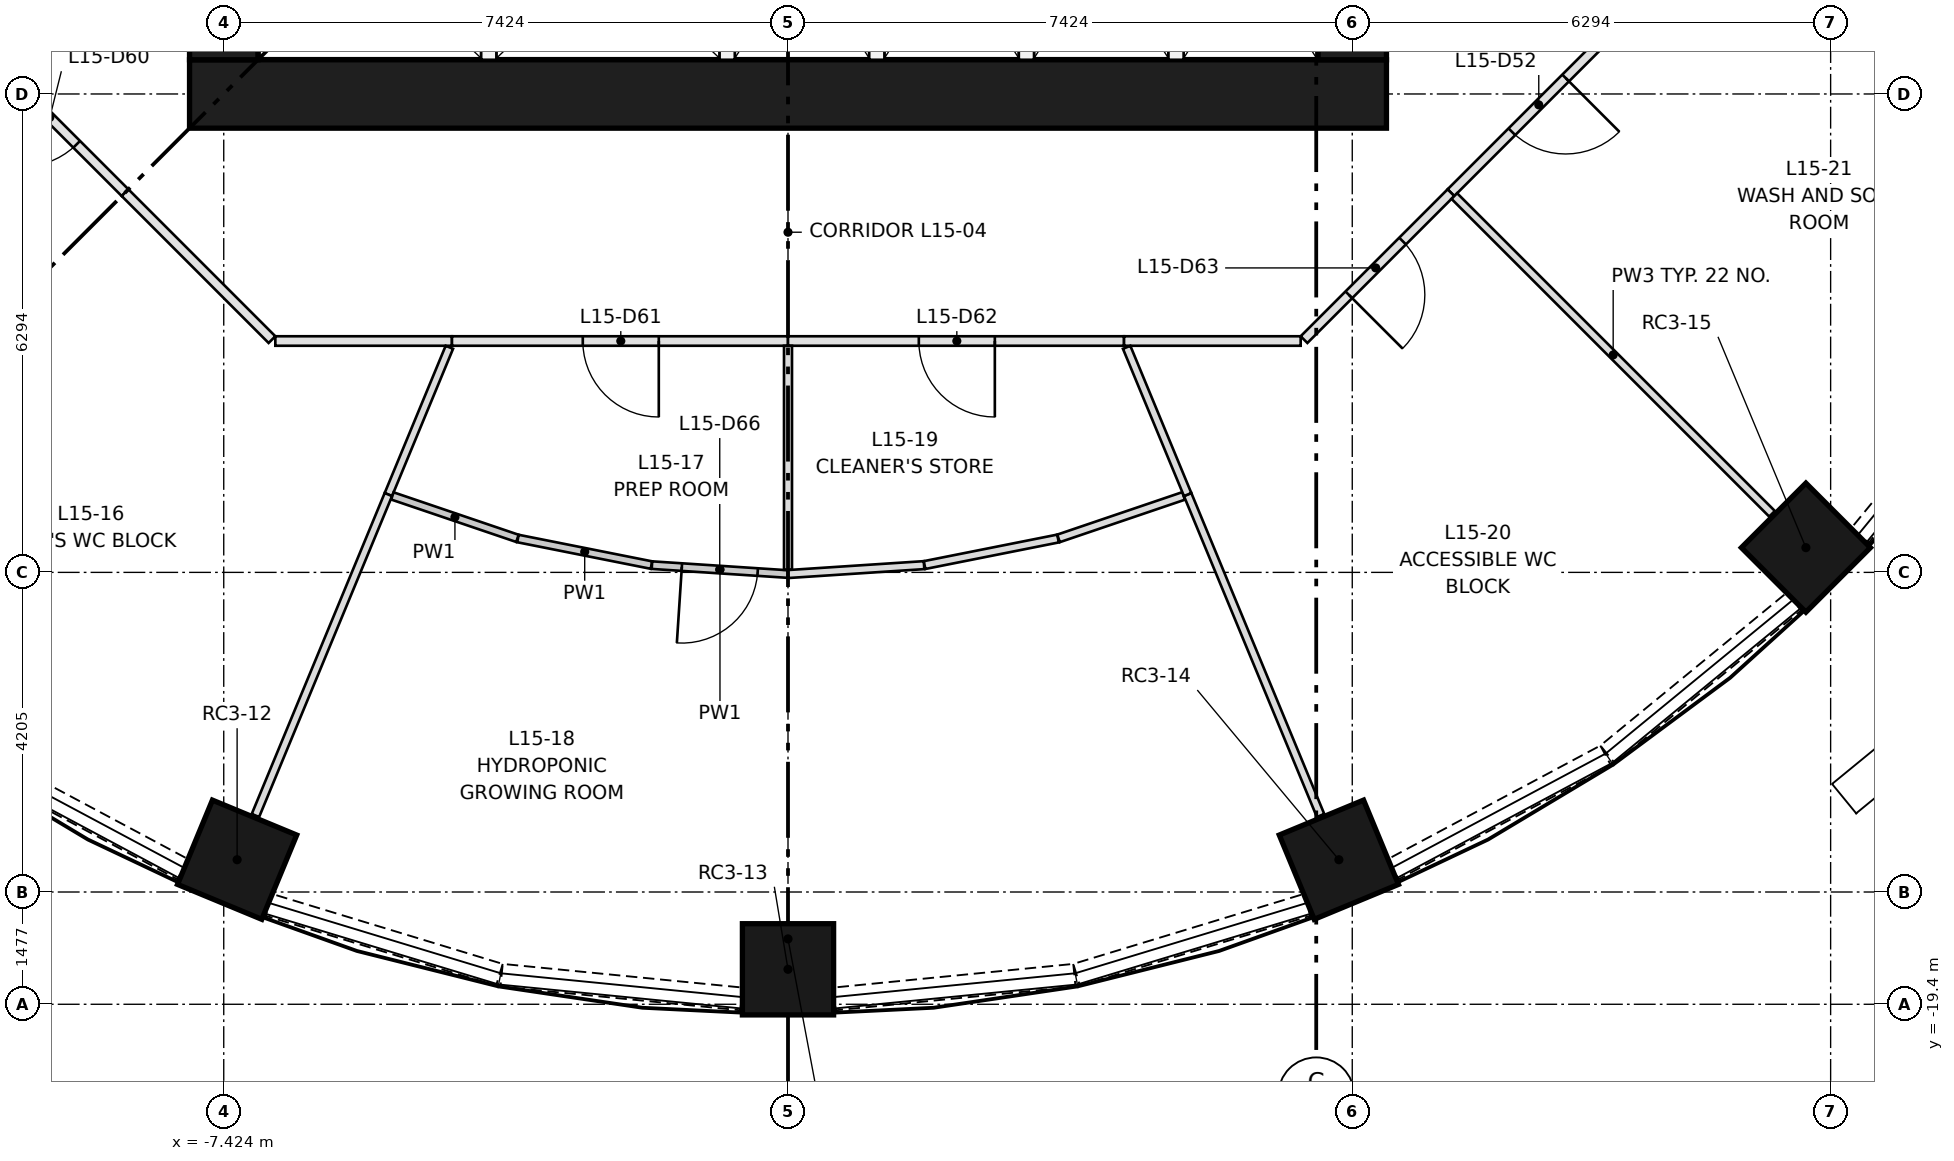
"""IFC4 building model, lengths in metres.
Left out: names, types, materials, properties, quantities, classifications, styles, units other than length and angle.
Written with IfcOpenShell. Run it as: python <this file> out.ifc"""

import sys

from ifc_helpers import new_model, si_unit, direction, frame, frame_2d, origin, origin_2d, place, context, subcontext, project, spatial, rectangle, extrude, element, fill, save


model = new_model("IFC4")
c1 = context("Model", 3, precision=1e-05, world=origin(), true_north=direction((0.0, 1.0)))
c2 = subcontext(c1, "Body", "Model", "MODEL_VIEW")
j1 = project(units=[si_unit("LENGTHUNIT", "METRE"), si_unit("PLANEANGLEUNIT", "RADIAN")], contexts=[c1])
p1 = place(None, origin())
s1 = spatial("IfcSite", under=j1, at=p1, CompositionType="ELEMENT")
p2 = place(p1, origin())
s2 = spatial("IfcBuilding", under=s1, at=p2, CompositionType="ELEMENT")
p3 = place(p2, frame((0.0, 0.0, 59.05)))
s3 = spatial("IfcBuildingStorey", under=s2, at=p3, CompositionType="ELEMENT", Elevation=59.05)
for number, where, z_axis, x_axis in (
    (1, (-7.248, -17.498, 0.0), (0.0, 0.0, 1.0), (-0.383, -0.924, 0.0)),
    (2, (0.0, -18.94, 0.0), (0.0, 0.0, 1.0), (0.0, -1.0, 0.0)),
    (3, (7.248, -17.498, 0.0), (0.0, 0.0, 1.0), (0.383, -0.924, 0.0)),
    (4, (13.393, -13.393, 0.0), (0.0, 0.0, 1.0), (0.707, -0.707, 0.0)),
):
    element("IfcColumn", number, at=place(p3, frame(where, z_axis=z_axis, x_axis=x_axis)), inside=s3, PredefinedType="COLUMN", context=c2, shape_type="SweptSolid", body=[
        extrude(rectangle(XDim=1.2, YDim=1.2, at=origin_2d()), origin(), (0.0, 0.0, 1.0), 3.65),
    ])
p4 = place(p3, frame((-7.874, -7.424, 0.0), z_axis=(0.0, 0.0, 1.0), x_axis=(1.0, 0.0, 0.0)))
e5 = element("IfcWall", 5, at=p4, inside=s3, PredefinedType="SHEAR", context=c2, shape_type="SweptSolid", body=[
    extrude(rectangle(XDim=15.748, YDim=0.9, at=frame_2d((7.874, 0.0))), origin(), (0.0, 0.0, 1.0), 3.65),
])
p5 = place(p3, frame((-7.424, -6.974, 0.0), z_axis=(0.0, 0.0, 1.0), x_axis=(0.0, 1.0, 0.0)))
e6 = element("IfcWall", 6, at=p5, inside=s3, PredefinedType="SHEAR", context=c2, shape_type="SweptSolid", body=[
    extrude(rectangle(XDim=13.948, YDim=0.9, at=frame_2d((6.974, 0.0))), origin(), (0.0, 0.0, 1.0), 3.65),
])
p6 = place(p5, frame((6.474, 0.0, 0.0)))
e7 = element("IfcOpeningElement", 7, at=p6, cuts=e6, PredefinedType="OPENING", context=c2, shape_type="SweptSolid", body=[
    extrude(rectangle(XDim=1.0, YDim=2.1, at=frame_2d((0.5, 1.05))), frame((0.0, 0.46, 0.0), z_axis=(0.0, -1.0, 0.0), x_axis=(1.0, 0.0, 0.0)), (0.0, 0.0, 1.0), 0.92),
])
p7 = place(p5, frame((3.35, 0.0, 0.0)))
e8 = element("IfcOpeningElement", 8, at=p7, cuts=e6, PredefinedType="OPENING", context=c2, shape_type="SweptSolid", body=[
    extrude(rectangle(XDim=1.8, YDim=2.1, at=frame_2d((0.9, 1.05))), frame((0.0, 0.46, 0.0), z_axis=(0.0, -1.0, 0.0), x_axis=(1.0, 0.0, 0.0)), (0.0, 0.0, 1.0), 0.92),
])
p8 = place(p5, frame((8.799, 0.0, 0.0)))
e9 = element("IfcOpeningElement", 9, at=p8, cuts=e6, PredefinedType="OPENING", context=c2, shape_type="SweptSolid", body=[
    extrude(rectangle(XDim=1.8, YDim=2.1, at=frame_2d((0.9, 1.05))), frame((0.0, 0.46, 0.0), z_axis=(0.0, -1.0, 0.0), x_axis=(1.0, 0.0, 0.0)), (0.0, 0.0, 1.0), 0.92),
])
p9 = place(p5, frame((11.974, 0.0, 0.0)))
e10 = element("IfcOpeningElement", 10, at=p9, cuts=e6, PredefinedType="OPENING", context=c2, shape_type="SweptSolid", body=[
    extrude(rectangle(XDim=1.0, YDim=2.1, at=frame_2d((0.5, 1.05))), frame((0.0, 0.46, 0.0), z_axis=(0.0, -1.0, 0.0), x_axis=(1.0, 0.0, 0.0)), (0.0, 0.0, 1.0), 0.92),
])
p10 = place(p3, frame((7.424, -6.974, 0.0), z_axis=(0.0, 0.0, 1.0), x_axis=(0.0, 1.0, 0.0)))
e11 = element("IfcWall", 11, at=p10, inside=s3, PredefinedType="SHEAR", context=c2, shape_type="SweptSolid", body=[
    extrude(rectangle(XDim=13.948, YDim=0.9, at=frame_2d((6.974, 0.0))), origin(), (0.0, 0.0, 1.0), 3.65),
])
p11 = place(p10, frame((6.474, 0.0, 0.0)))
e12 = element("IfcOpeningElement", 12, at=p11, cuts=e11, PredefinedType="OPENING", context=c2, shape_type="SweptSolid", body=[
    extrude(rectangle(XDim=1.0, YDim=2.1, at=frame_2d((0.5, 1.05))), frame((0.0, 0.46, 0.0), z_axis=(0.0, -1.0, 0.0), x_axis=(1.0, 0.0, 0.0)), (0.0, 0.0, 1.0), 0.92),
])
p12 = place(p10, frame((3.35, 0.0, 0.0)))
e13 = element("IfcOpeningElement", 13, at=p12, cuts=e11, PredefinedType="OPENING", context=c2, shape_type="SweptSolid", body=[
    extrude(rectangle(XDim=1.8, YDim=2.1, at=frame_2d((0.9, 1.05))), frame((0.0, 0.46, 0.0), z_axis=(0.0, -1.0, 0.0), x_axis=(1.0, 0.0, 0.0)), (0.0, 0.0, 1.0), 0.92),
])
p13 = place(p10, frame((8.799, 0.0, 0.0)))
e14 = element("IfcOpeningElement", 14, at=p13, cuts=e11, PredefinedType="OPENING", context=c2, shape_type="SweptSolid", body=[
    extrude(rectangle(XDim=1.8, YDim=2.1, at=frame_2d((0.9, 1.05))), frame((0.0, 0.46, 0.0), z_axis=(0.0, -1.0, 0.0), x_axis=(1.0, 0.0, 0.0)), (0.0, 0.0, 1.0), 0.92),
])
for number, where, z_axis, x_axis in (
    (15, (-3.937, -6.974, 0.0), (0.0, 0.0, 1.0), (0.0, 1.0, 0.0)),
    (16, (-0.8, -6.974, 0.0), (0.0, 0.0, 1.0), (0.0, 1.0, 0.0)),
    (17, (1.168, -6.974, 0.0), (0.0, 0.0, 1.0), (0.0, 1.0, 0.0)),
    (18, (3.137, -6.974, 0.0), (0.0, 0.0, 1.0), (0.0, 1.0, 0.0)),
    (19, (5.105, -6.974, 0.0), (0.0, 0.0, 1.0), (0.0, 1.0, 0.0)),
):
    element("IfcWall", number, at=place(p3, frame(where, z_axis=z_axis, x_axis=x_axis)), inside=s3, PredefinedType="PARTITIONING", context=c2, shape_type="SweptSolid", body=[
        extrude(rectangle(XDim=2.8, YDim=0.2, at=frame_2d((1.4, 0.0))), origin(), (0.0, 0.0, 1.0), 3.3),
    ])
p14 = place(p3, frame((-10.759, -16.129, 0.0), z_axis=(0.0, 0.0, 1.0), x_axis=(0.882007292685, -0.47123575379, 0.0)))
e20 = element("IfcWall", 20, at=p14, inside=s3, PredefinedType="SOLIDWALL", context=c2, shape_type="SweptSolid", body=[
    extrude(rectangle(XDim=3.17, YDim=0.3, at=frame_2d((1.585, 0.0))), origin(), (0.0, 0.0, 1.0), 0.9),
])
p15 = place(p3, frame((-6.83, -18.092, 0.0), z_axis=(0.0, 0.0, 1.0), x_axis=(0.956888224489, -0.290456409527, 0.0)))
e21 = element("IfcWall", 21, at=p15, inside=s3, PredefinedType="SOLIDWALL", context=c2, shape_type="SweptSolid", body=[
    extrude(rectangle(XDim=3.169, YDim=0.3, at=frame_2d((1.584, 0.0))), origin(), (0.0, 0.0, 1.0), 0.9),
])
for number, where, z_axis, x_axis in (
    (22, (-3.768, -19.019, 0.0), (0.0, 0.0, 1.0), (0.995, -0.098, 0.0)),
    (23, (0.613, -19.33, 0.0), (0.0, 0.0, 1.0), (0.995, 0.098, 0.0)),
):
    element("IfcWall", number, at=place(p3, frame(where, z_axis=z_axis, x_axis=x_axis)), inside=s3, PredefinedType="SOLIDWALL", context=c2, shape_type="SweptSolid", body=[
        extrude(rectangle(XDim=3.171, YDim=0.3, at=frame_2d((1.585, 0.0))), origin(), (0.0, 0.0, 1.0), 0.9),
    ])
p16 = place(p3, frame((3.797, -19.013, 0.0), z_axis=(0.0, 0.0, 1.0), x_axis=(0.956888224489, 0.290456409527, 0.0)))
e24 = element("IfcWall", 24, at=p16, inside=s3, PredefinedType="SOLIDWALL", context=c2, shape_type="SweptSolid", body=[
    extrude(rectangle(XDim=3.169, YDim=0.3, at=frame_2d((1.584, 0.0))), origin(), (0.0, 0.0, 1.0), 0.9),
])
p17 = place(p3, frame((7.963, -17.623, 0.0), z_axis=(0.0, 0.0, 1.0), x_axis=(0.882007292685, 0.47123575379, 0.0)))
e25 = element("IfcWall", 25, at=p17, inside=s3, PredefinedType="SOLIDWALL", context=c2, shape_type="SweptSolid", body=[
    extrude(rectangle(XDim=3.17, YDim=0.3, at=frame_2d((1.585, 0.0))), origin(), (0.0, 0.0, 1.0), 0.9),
])
for number, where, z_axis, x_axis in (
    (26, (10.784, -16.113, 0.0), (0.0, 0.0, 1.0), (0.773, 0.634, 0.0)),
    (27, (14.103, -13.234, 0.0), (0.0, 0.0, 1.0), (0.634, 0.773, 0.0)),
):
    element("IfcWall", number, at=place(p3, frame(where, z_axis=z_axis, x_axis=x_axis)), inside=s3, PredefinedType="SOLIDWALL", context=c2, shape_type="SweptSolid", body=[
        extrude(rectangle(XDim=3.169, YDim=0.3, at=frame_2d((1.585, 0.0))), origin(), (0.0, 0.0, 1.0), 0.9),
    ])
p18 = place(p3, frame((10.656, -6.789, 0.0), z_axis=(0.0, 0.0, 1.0), x_axis=(-0.707151428813, -0.707062130741, 0.0)))
e28 = element("IfcWall", 28, at=p18, inside=s3, PredefinedType="PARTITIONING", context=c2, shape_type="SweptSolid", body=[
    extrude(rectangle(XDim=2.734, YDim=0.125, at=frame_2d((1.367, 0.0))), origin(), (0.0, 0.0, 1.0), 3.3),
])
p19 = place(p18, frame((0.6, 0.0, 0.0)))
e29 = element("IfcOpeningElement", 29, at=p19, cuts=e28, PredefinedType="OPENING", context=c2, shape_type="SweptSolid", body=[
    extrude(rectangle(XDim=1.0, YDim=2.1, at=frame_2d((0.5, 1.05))), frame((0.0, 0.073, 0.0), z_axis=(0.0, -1.0, 0.0), x_axis=(1.0, 0.0, 0.0)), (0.0, 0.0, 1.0), 0.145),
])
p20 = place(p3, frame((-8.722, -8.722, 0.0), z_axis=(0.0, 0.0, 1.0), x_axis=(-0.707151428813, 0.707062130741, 0.0)))
e30 = element("IfcWall", 30, at=p20, inside=s3, PredefinedType="PARTITIONING", context=c2, shape_type="SweptSolid", body=[
    extrude(rectangle(XDim=2.734, YDim=0.125, at=frame_2d((1.367, 0.0))), origin(), (0.0, 0.0, 1.0), 3.3),
])
p21 = place(p20, frame((0.9, 0.0, 0.0)))
e31 = element("IfcOpeningElement", 31, at=p21, cuts=e30, PredefinedType="OPENING", context=c2, shape_type="SweptSolid", body=[
    extrude(rectangle(XDim=1.0, YDim=2.1, at=frame_2d((0.5, 1.05))), frame((0.0, 0.073, 0.0), z_axis=(0.0, -1.0, 0.0), x_axis=(1.0, 0.0, 0.0)), (0.0, 0.0, 1.0), 0.145),
])
p22 = place(p3, frame((-6.789, -10.656, 0.0), z_axis=(0.0, 0.0, 1.0), x_axis=(-0.707062130741, 0.707151428813, 0.0)))
e32 = element("IfcWall", 32, at=p22, inside=s3, PredefinedType="PARTITIONING", context=c2, shape_type="SweptSolid", body=[
    extrude(rectangle(XDim=2.734, YDim=0.125, at=frame_2d((1.367, 0.0))), origin(), (0.0, 0.0, 1.0), 3.3),
])
p23 = place(p3, frame((-4.421, -10.674, 0.0), z_axis=(0.0, 0.0, 1.0), x_axis=(-1.0, 0.0, 0.0)))
e33 = element("IfcWall", 33, at=p23, inside=s3, PredefinedType="PARTITIONING", context=c2, shape_type="SweptSolid", body=[
    extrude(rectangle(XDim=2.324, YDim=0.125, at=frame_2d((1.162, 0.0))), origin(), (0.0, 0.0, 1.0), 3.3),
])
p24 = place(p3, frame((0.0, -10.674, 0.0), z_axis=(0.0, 0.0, 1.0), x_axis=(-1.0, 0.0, 0.0)))
e34 = element("IfcWall", 34, at=p24, inside=s3, PredefinedType="PARTITIONING", context=c2, shape_type="SweptSolid", body=[
    extrude(rectangle(XDim=4.421, YDim=0.125, at=frame_2d((2.211, 0.0))), origin(), (0.0, 0.0, 1.0), 3.3),
])
p25 = place(p24, frame((1.7, 0.0, 0.0)))
e35 = element("IfcOpeningElement", 35, at=p25, cuts=e34, PredefinedType="OPENING", context=c2, shape_type="SweptSolid", body=[
    extrude(rectangle(XDim=1.0, YDim=2.1, at=frame_2d((0.5, 1.05))), frame((0.0, 0.073, 0.0), z_axis=(0.0, -1.0, 0.0), x_axis=(1.0, 0.0, 0.0)), (0.0, 0.0, 1.0), 0.145),
])
p26 = place(p3, frame((4.421, -10.674, 0.0), z_axis=(0.0, 0.0, 1.0), x_axis=(-1.0, 0.0, 0.0)))
e36 = element("IfcWall", 36, at=p26, inside=s3, PredefinedType="PARTITIONING", context=c2, shape_type="SweptSolid", body=[
    extrude(rectangle(XDim=4.421, YDim=0.125, at=frame_2d((2.211, 0.0))), origin(), (0.0, 0.0, 1.0), 3.3),
])
p27 = place(p26, frame((1.7, 0.0, 0.0)))
e37 = element("IfcOpeningElement", 37, at=p27, cuts=e36, PredefinedType="OPENING", context=c2, shape_type="SweptSolid", body=[
    extrude(rectangle(XDim=1.0, YDim=2.1, at=frame_2d((0.5, 1.05))), frame((0.0, 0.073, 0.0), z_axis=(0.0, -1.0, 0.0), x_axis=(1.0, 0.0, 0.0)), (0.0, 0.0, 1.0), 0.145),
])
p28 = place(p3, frame((6.745, -10.674, 0.0), z_axis=(0.0, 0.0, 1.0), x_axis=(-1.0, 0.0, 0.0)))
e38 = element("IfcWall", 38, at=p28, inside=s3, PredefinedType="PARTITIONING", context=c2, shape_type="SweptSolid", body=[
    extrude(rectangle(XDim=2.324, YDim=0.125, at=frame_2d((1.162, 0.0))), origin(), (0.0, 0.0, 1.0), 3.3),
])
p29 = place(p3, frame((8.722, -8.722, 0.0), z_axis=(0.0, 0.0, 1.0), x_axis=(-0.707062130741, -0.707151428813, 0.0)))
e39 = element("IfcWall", 39, at=p29, inside=s3, PredefinedType="PARTITIONING", context=c2, shape_type="SweptSolid", body=[
    extrude(rectangle(XDim=2.734, YDim=0.125, at=frame_2d((1.367, 0.0))), origin(), (0.0, 0.0, 1.0), 3.3),
])
p30 = place(p29, frame((0.9, 0.0, 0.0)))
e40 = element("IfcOpeningElement", 40, at=p30, cuts=e39, PredefinedType="OPENING", context=c2, shape_type="SweptSolid", body=[
    extrude(rectangle(XDim=1.0, YDim=2.1, at=frame_2d((0.5, 1.05))), frame((0.0, 0.073, 0.0), z_axis=(0.0, -1.0, 0.0), x_axis=(1.0, 0.0, 0.0)), (0.0, 0.0, 1.0), 0.145),
])
p31 = place(p3, frame((16.916, -7.007, 0.0), z_axis=(0.0, 0.0, 1.0), x_axis=(-0.923860783753, 0.382728692736, 0.0)))
e41 = element("IfcWall", 41, at=p31, inside=s3, PredefinedType="PARTITIONING", context=c2, shape_type="SweptSolid", body=[
    extrude(rectangle(XDim=3.07, YDim=0.105, at=frame_2d((1.535, 0.0))), origin(), (0.0, 0.0, 1.0), 3.3),
])
p32 = place(p3, frame((-4.456, -10.757, 0.0), z_axis=(0.0, 0.0, 1.0), x_axis=(-0.382663674763, -0.92388771613, 0.0)))
e42 = element("IfcWall", 42, at=p32, inside=s3, PredefinedType="PARTITIONING", context=c2, shape_type="SweptSolid", body=[
    extrude(rectangle(XDim=2.097, YDim=0.105, at=frame_2d((1.049, 0.0))), origin(), (0.0, 0.0, 1.0), 3.3),
])
p33 = place(p3, frame((-5.258, -12.694, 0.0), z_axis=(0.0, 0.0, 1.0), x_axis=(-0.382710364739, -0.923868376297, 0.0)))
e43 = element("IfcWall", 43, at=p33, inside=s3, PredefinedType="PARTITIONING", context=c2, shape_type="SweptSolid", body=[
    extrude(rectangle(XDim=4.57, YDim=0.105, at=frame_2d((2.285, 0.0))), origin(), (0.0, 0.0, 1.0), 3.3),
])
p34 = place(p3, frame((-3.559, -13.271, 0.0), z_axis=(0.0, 0.0, 1.0), x_axis=(-0.946941295521, 0.321406569374, 0.0)))
e44 = element("IfcWall", 44, at=p34, inside=s3, PredefinedType="PARTITIONING", context=c2, shape_type="SweptSolid", body=[
    extrude(rectangle(XDim=1.738, YDim=0.1, at=frame_2d((0.869, 0.0))), origin(), (0.0, 0.0, 1.0), 3.3),
])
p35 = place(p3, frame((-1.797, -13.622, 0.0), z_axis=(0.0, 0.0, 1.0), x_axis=(-0.980784643133, 0.195093525761, 0.0)))
e45 = element("IfcWall", 45, at=p35, inside=s3, PredefinedType="PARTITIONING", context=c2, shape_type="SweptSolid", body=[
    extrude(rectangle(XDim=1.791, YDim=0.1, at=frame_2d((0.896, 0.0))), origin(), (0.0, 0.0, 1.0), 3.3),
])
p36 = place(p3, frame((0.0, -13.74, 0.0), z_axis=(0.0, 0.0, 1.0), x_axis=(-0.997863935765, 0.065326607906, 0.0)))
e46 = element("IfcWall", 46, at=p36, inside=s3, PredefinedType="PARTITIONING", context=c2, shape_type="SweptSolid", body=[
    extrude(rectangle(XDim=1.794, YDim=0.1, at=frame_2d((0.897, 0.0))), origin(), (0.0, 0.0, 1.0), 3.3),
])
p37 = place(p36, frame((0.4, 0.0, 0.0)))
e47 = element("IfcOpeningElement", 47, at=p37, cuts=e46, PredefinedType="OPENING", context=c2, shape_type="SweptSolid", body=[
    extrude(rectangle(XDim=1.0, YDim=2.1, at=frame_2d((0.5, 1.05))), frame((0.0, 0.06, 0.0), z_axis=(0.0, -1.0, 0.0), x_axis=(1.0, 0.0, 0.0)), (0.0, 0.0, 1.0), 0.12),
])
p38 = place(p3, frame((0.0, -10.737, 0.0), z_axis=(0.0, 0.0, 1.0), x_axis=(0.0, -1.0, 0.0)))
e48 = element("IfcWall", 48, at=p38, inside=s3, PredefinedType="PARTITIONING", context=c2, shape_type="SweptSolid", body=[
    extrude(rectangle(XDim=2.947, YDim=0.105, at=frame_2d((1.474, 0.0))), origin(), (0.0, 0.0, 1.0), 3.3),
])
p39 = place(p3, frame((0.0, -13.74, 0.0), z_axis=(0.0, 0.0, 1.0), x_axis=(0.997863935765, 0.065326607906, 0.0)))
e49 = element("IfcWall", 49, at=p39, inside=s3, PredefinedType="PARTITIONING", context=c2, shape_type="SweptSolid", body=[
    extrude(rectangle(XDim=1.794, YDim=0.105, at=frame_2d((0.897, 0.0))), origin(), (0.0, 0.0, 1.0), 3.3),
])
p40 = place(p3, frame((1.797, -13.622, 0.0), z_axis=(0.0, 0.0, 1.0), x_axis=(0.980774260843, 0.195145712912, 0.0)))
e50 = element("IfcWall", 50, at=p40, inside=s3, PredefinedType="PARTITIONING", context=c2, shape_type="SweptSolid", body=[
    extrude(rectangle(XDim=1.79, YDim=0.105, at=frame_2d((0.895, 0.0))), origin(), (0.0, 0.0, 1.0), 3.3),
])
p41 = place(p3, frame((3.56, -13.271, 0.0), z_axis=(0.0, 0.0, 1.0), x_axis=(0.946926781261, 0.321449328713, 0.0)))
e51 = element("IfcWall", 51, at=p41, inside=s3, PredefinedType="PARTITIONING", context=c2, shape_type="SweptSolid", body=[
    extrude(rectangle(XDim=1.738, YDim=0.105, at=frame_2d((0.869, 0.0))), origin(), (0.0, 0.0, 1.0), 3.3),
])
p42 = place(p3, frame((5.258, -12.694, 0.0), z_axis=(0.0, 0.0, 1.0), x_axis=(0.382710364739, -0.923868376297, 0.0)))
e52 = element("IfcWall", 52, at=p42, inside=s3, PredefinedType="PARTITIONING", context=c2, shape_type="SweptSolid", body=[
    extrude(rectangle(XDim=4.57, YDim=0.105, at=frame_2d((2.285, 0.0))), origin(), (0.0, 0.0, 1.0), 3.3),
])
p43 = place(p3, frame((4.456, -10.757, 0.0), z_axis=(0.0, 0.0, 1.0), x_axis=(0.382663674763, -0.92388771613, 0.0)))
e53 = element("IfcWall", 53, at=p43, inside=s3, PredefinedType="PARTITIONING", context=c2, shape_type="SweptSolid", body=[
    extrude(rectangle(XDim=2.097, YDim=0.105, at=frame_2d((1.049, 0.0))), origin(), (0.0, 0.0, 1.0), 3.3),
])
p44 = place(p3, frame((8.767, -8.767, 0.0), z_axis=(0.0, 0.0, 1.0), x_axis=(0.707106781187, -0.707106781187, 0.0)))
e54 = element("IfcWall", 54, at=p44, inside=s3, PredefinedType="PARTITIONING", context=c2, shape_type="SweptSolid", body=[
    extrude(rectangle(XDim=5.912, YDim=0.105, at=frame_2d((2.956, 0.0))), origin(), (0.0, 0.0, 1.0), 3.3),
])
p45 = place(p19, origin())
e55 = element("IfcDoor", 55, at=p45, inside=s3, OperationType="SINGLE_SWING_LEFT", PredefinedType="DOOR", context=c2, shape_type="SweptSolid", body=[
    extrude(rectangle(XDim=1.0, YDim=2.1, at=frame_2d((0.5, 1.05))), frame((0.0, 0.025, 0.0), z_axis=(0.0, -1.0, 0.0), x_axis=(1.0, 0.0, 0.0)), (0.0, 0.0, 1.0), 0.05),
])
fill(e29, e55)
p46 = place(p21, origin())
e56 = element("IfcDoor", 56, at=p46, inside=s3, OperationType="SINGLE_SWING_RIGHT", PredefinedType="DOOR", context=c2, shape_type="SweptSolid", body=[
    extrude(rectangle(XDim=1.0, YDim=2.1, at=frame_2d((0.5, 1.05))), frame((0.0, 0.025, 0.0), z_axis=(0.0, -1.0, 0.0), x_axis=(1.0, 0.0, 0.0)), (0.0, 0.0, 1.0), 0.05),
])
fill(e31, e56)
p47 = place(p25, origin())
e57 = element("IfcDoor", 57, at=p47, inside=s3, OperationType="SINGLE_SWING_LEFT", PredefinedType="DOOR", context=c2, shape_type="SweptSolid", body=[
    extrude(rectangle(XDim=1.0, YDim=2.1, at=frame_2d((0.5, 1.05))), frame((0.0, 0.025, 0.0), z_axis=(0.0, -1.0, 0.0), x_axis=(1.0, 0.0, 0.0)), (0.0, 0.0, 1.0), 0.05),
])
fill(e35, e57)
p48 = place(p27, origin())
e58 = element("IfcDoor", 58, at=p48, inside=s3, OperationType="SINGLE_SWING_LEFT", PredefinedType="DOOR", context=c2, shape_type="SweptSolid", body=[
    extrude(rectangle(XDim=1.0, YDim=2.1, at=frame_2d((0.5, 1.05))), frame((0.0, 0.025, 0.0), z_axis=(0.0, -1.0, 0.0), x_axis=(1.0, 0.0, 0.0)), (0.0, 0.0, 1.0), 0.05),
])
fill(e37, e58)
p49 = place(p30, origin())
e59 = element("IfcDoor", 59, at=p49, inside=s3, OperationType="SINGLE_SWING_RIGHT", PredefinedType="DOOR", context=c2, shape_type="SweptSolid", body=[
    extrude(rectangle(XDim=1.0, YDim=2.1, at=frame_2d((0.5, 1.05))), frame((0.0, 0.025, 0.0), z_axis=(0.0, -1.0, 0.0), x_axis=(1.0, 0.0, 0.0)), (0.0, 0.0, 1.0), 0.05),
])
fill(e40, e59)
p50 = place(p37, origin())
e60 = element("IfcDoor", 60, at=p50, inside=s3, OperationType="SINGLE_SWING_RIGHT", PredefinedType="DOOR", context=c2, shape_type="SweptSolid", body=[
    extrude(rectangle(XDim=1.0, YDim=2.1, at=frame_2d((0.5, 1.05))), frame((0.0, 0.025, 0.0), z_axis=(0.0, -1.0, 0.0), x_axis=(1.0, 0.0, 0.0)), (0.0, 0.0, 1.0), 0.05),
])
fill(e47, e60)
save(model, sys.argv[1])
